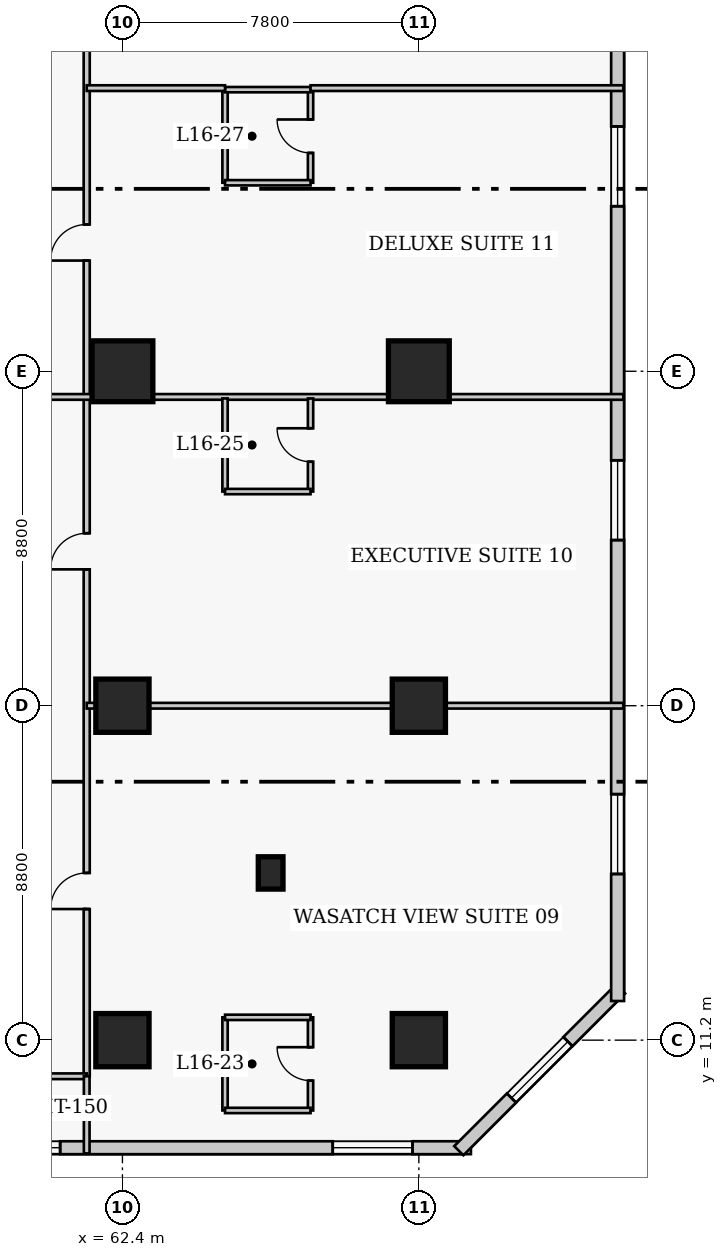
"""IFC4 building model, lengths in metres.
Left out: names, types, materials, properties, quantities, classifications, styles, units other than length and angle.
Written with IfcOpenShell. Run it as: python <this file> out.ifc"""

import sys

from ifc_helpers import new_model, si_unit, direction, frame, frame_2d, origin, origin_2d, place, context, subcontext, project, spatial, rectangle, extrude, element, fill, save


model = new_model("IFC4")
c1 = context("Model", 3, precision=1e-05, world=origin(), true_north=direction((0.0, 1.0)))
c2 = subcontext(c1, "Body", "Model", "MODEL_VIEW")
j1 = project(units=[si_unit("LENGTHUNIT", "METRE"), si_unit("PLANEANGLEUNIT", "RADIAN")], contexts=[c1])
p1 = place(None, origin())
s1 = spatial("IfcSite", under=j1, at=p1, CompositionType="ELEMENT")
p2 = place(p1, origin())
s2 = spatial("IfcBuilding", under=s1, at=p2, CompositionType="ELEMENT")
p3 = place(p2, frame((0.0, 0.0, 67.8)))
s3 = spatial("IfcBuildingStorey", under=s2, at=p3, CompositionType="ELEMENT", Elevation=67.8)
for number, where, z_axis, x_axis in (
    (1, (62.4, 11.2, 0.0), (0.0, 0.0, 1.0), (1.0, 0.0, 0.0)),
    (2, (62.4, 20.0, 0.0), (0.0, 0.0, 1.0), (1.0, 0.0, 0.0)),
):
    element("IfcColumn", number, at=place(p3, frame(where, z_axis=z_axis, x_axis=x_axis)), inside=s3, PredefinedType="COLUMN", context=c2, shape_type="SweptSolid", body=[
        extrude(rectangle(XDim=1.4, YDim=1.4, at=origin_2d()), origin(), (0.0, 0.0, 1.0), 3.8),
    ])
p4 = place(p3, frame((62.4, 28.8, 0.0), z_axis=(0.0, 0.0, 1.0), x_axis=(1.0, 0.0, 0.0)))
e3 = element("IfcColumn", 3, at=p4, inside=s3, PredefinedType="COLUMN", context=c2, shape_type="SweptSolid", body=[
    extrude(rectangle(XDim=1.6, YDim=1.6, at=origin_2d()), origin(), (0.0, 0.0, 1.0), 3.8),
])
for number, where, z_axis, x_axis in (
    (4, (70.2, 11.2, 0.0), (0.0, 0.0, 1.0), (1.0, 0.0, 0.0)),
    (5, (70.2, 20.0, 0.0), (0.0, 0.0, 1.0), (1.0, 0.0, 0.0)),
):
    element("IfcColumn", number, at=place(p3, frame(where, z_axis=z_axis, x_axis=x_axis)), inside=s3, PredefinedType="COLUMN", context=c2, shape_type="SweptSolid", body=[
        extrude(rectangle(XDim=1.4, YDim=1.4, at=origin_2d()), origin(), (0.0, 0.0, 1.0), 3.8),
    ])
p5 = place(p3, frame((70.2, 28.8, 0.0), z_axis=(0.0, 0.0, 1.0), x_axis=(1.0, 0.0, 0.0)))
e6 = element("IfcColumn", 6, at=p5, inside=s3, PredefinedType="COLUMN", context=c2, shape_type="SweptSolid", body=[
    extrude(rectangle(XDim=1.6, YDim=1.6, at=origin_2d()), origin(), (0.0, 0.0, 1.0), 3.8),
])
p6 = place(p3, frame((66.3, 15.6, 0.0), z_axis=(0.0, 0.0, 1.0), x_axis=(1.0, 0.0, 0.0)))
e7 = element("IfcColumn", 7, at=p6, inside=s3, PredefinedType="PILASTER", context=c2, shape_type="SweptSolid", body=[
    extrude(rectangle(XDim=0.65, YDim=0.85, at=origin_2d()), origin(), (0.0, 0.0, 1.0), 3.8),
])
p7 = place(p3, frame((41.68, 8.37, 0.0), z_axis=(0.0, 0.0, 1.0), x_axis=(1.0, 0.0, 0.0)))
e8 = element("IfcWall", 8, at=p7, inside=s3, PredefinedType="SOLIDWALL", context=c2, shape_type="SweptSolid", body=[
    extrude(rectangle(XDim=29.89, YDim=0.34, at=frame_2d((14.945, 0.0))), origin(), (0.0, 0.0, 1.0), 3.54),
])
p8 = place(p7, frame((2.036, 0.0, 0.85)))
e9 = element("IfcOpeningElement", 9, at=p8, cuts=e8, PredefinedType="OPENING", context=c2, shape_type="SweptSolid", body=[
    extrude(rectangle(XDim=2.1, YDim=1.85, at=frame_2d((1.05, 0.925))), frame((0.0, 0.18, 0.0), z_axis=(0.0, -1.0, 0.0), x_axis=(1.0, 0.0, 0.0)), (0.0, 0.0, 1.0), 0.36),
])
p9 = place(p7, frame((9.509, 0.0, 0.85)))
e10 = element("IfcOpeningElement", 10, at=p9, cuts=e8, PredefinedType="OPENING", context=c2, shape_type="SweptSolid", body=[
    extrude(rectangle(XDim=2.1, YDim=1.85, at=frame_2d((1.05, 0.925))), frame((0.0, 0.18, 0.0), z_axis=(0.0, -1.0, 0.0), x_axis=(1.0, 0.0, 0.0)), (0.0, 0.0, 1.0), 0.36),
])
p10 = place(p7, frame((16.981, 0.0, 0.85)))
e11 = element("IfcOpeningElement", 11, at=p10, cuts=e8, PredefinedType="OPENING", context=c2, shape_type="SweptSolid", body=[
    extrude(rectangle(XDim=2.1, YDim=1.85, at=frame_2d((1.05, 0.925))), frame((0.0, 0.18, 0.0), z_axis=(0.0, -1.0, 0.0), x_axis=(1.0, 0.0, 0.0)), (0.0, 0.0, 1.0), 0.36),
])
p11 = place(p7, frame((26.254, 0.0, 0.85)))
e12 = element("IfcOpeningElement", 12, at=p11, cuts=e8, PredefinedType="OPENING", context=c2, shape_type="SweptSolid", body=[
    extrude(rectangle(XDim=2.1, YDim=1.85, at=frame_2d((1.05, 0.925))), frame((0.0, 0.18, 0.0), z_axis=(0.0, -1.0, 0.0), x_axis=(1.0, 0.0, 0.0)), (0.0, 0.0, 1.0), 0.36),
])
p12 = place(p7, frame((14.265, 0.0, 0.85)))
e13 = element("IfcOpeningElement", 13, at=p12, cuts=e8, PredefinedType="OPENING", context=c2, shape_type="SweptSolid", body=[
    extrude(rectangle(XDim=1.3, YDim=1.7, at=frame_2d((0.65, 0.85))), frame((0.0, 0.18, 0.0), z_axis=(0.0, -1.0, 0.0), x_axis=(1.0, 0.0, 0.0)), (0.0, 0.0, 1.0), 0.36),
])
p13 = place(p3, frame((71.251, 8.292, 0.0), z_axis=(0.0, 0.0, 1.0), x_axis=(0.707106781187, 0.707106781187, 0.0)))
e14 = element("IfcWall", 14, at=p13, inside=s3, PredefinedType="SOLIDWALL", context=c2, shape_type="SweptSolid", body=[
    extrude(rectangle(XDim=6.02, YDim=0.34, at=frame_2d((3.01, 0.0))), origin(), (0.0, 0.0, 1.0), 3.54),
])
p14 = place(p13, frame((1.96, 0.0, 0.85)))
e15 = element("IfcOpeningElement", 15, at=p14, cuts=e14, PredefinedType="OPENING", context=c2, shape_type="SweptSolid", body=[
    extrude(rectangle(XDim=2.1, YDim=1.85, at=frame_2d((1.05, 0.925))), frame((0.0, 0.18, 0.0), z_axis=(0.0, -1.0, 0.0), x_axis=(1.0, 0.0, 0.0)), (0.0, 0.0, 1.0), 0.36),
])
p15 = place(p3, frame((75.43, 12.23, 0.0), z_axis=(0.0, 0.0, 1.0), x_axis=(0.0, 1.0, 0.0)))
e16 = element("IfcWall", 16, at=p15, inside=s3, PredefinedType="SOLIDWALL", context=c2, shape_type="SweptSolid", body=[
    extrude(rectangle(XDim=35.14, YDim=0.34, at=frame_2d((17.57, 0.0))), origin(), (0.0, 0.0, 1.0), 3.54),
])
p16 = place(p15, frame((3.343, 0.0, 0.85)))
e17 = element("IfcOpeningElement", 17, at=p16, cuts=e16, PredefinedType="OPENING", context=c2, shape_type="SweptSolid", body=[
    extrude(rectangle(XDim=2.1, YDim=1.85, at=frame_2d((1.05, 0.925))), frame((0.0, 0.18, 0.0), z_axis=(0.0, -1.0, 0.0), x_axis=(1.0, 0.0, 0.0)), (0.0, 0.0, 1.0), 0.36),
])
p17 = place(p15, frame((12.127, 0.0, 0.85)))
e18 = element("IfcOpeningElement", 18, at=p17, cuts=e16, PredefinedType="OPENING", context=c2, shape_type="SweptSolid", body=[
    extrude(rectangle(XDim=2.1, YDim=1.85, at=frame_2d((1.05, 0.925))), frame((0.0, 0.18, 0.0), z_axis=(0.0, -1.0, 0.0), x_axis=(1.0, 0.0, 0.0)), (0.0, 0.0, 1.0), 0.36),
])
p18 = place(p15, frame((20.913, 0.0, 0.85)))
e19 = element("IfcOpeningElement", 19, at=p18, cuts=e16, PredefinedType="OPENING", context=c2, shape_type="SweptSolid", body=[
    extrude(rectangle(XDim=2.1, YDim=1.85, at=frame_2d((1.05, 0.925))), frame((0.0, 0.18, 0.0), z_axis=(0.0, -1.0, 0.0), x_axis=(1.0, 0.0, 0.0)), (0.0, 0.0, 1.0), 0.36),
])
p19 = place(p15, frame((29.698, 0.0, 0.85)))
e20 = element("IfcOpeningElement", 20, at=p19, cuts=e16, PredefinedType="OPENING", context=c2, shape_type="SweptSolid", body=[
    extrude(rectangle(XDim=2.1, YDim=1.85, at=frame_2d((1.05, 0.925))), frame((0.0, 0.18, 0.0), z_axis=(0.0, -1.0, 0.0), x_axis=(1.0, 0.0, 0.0)), (0.0, 0.0, 1.0), 0.36),
])
p20 = place(p3, frame((61.46, 10.25, 0.0), z_axis=(0.0, 0.0, 1.0), x_axis=(0.0, 1.0, 0.0)))
e21 = element("IfcWall", 21, at=p20, inside=s3, PredefinedType="PARTITIONING", context=c2, shape_type="SweptSolid", body=[
    extrude(rectangle(XDim=30.4, YDim=0.16, at=frame_2d((15.2, 0.0))), origin(), (0.0, 0.0, 1.0), 3.54),
])
p21 = place(p20, frame((4.4, 0.0, 0.0)))
e22 = element("IfcOpeningElement", 22, at=p21, cuts=e21, PredefinedType="OPENING", context=c2, shape_type="SweptSolid", body=[
    extrude(rectangle(XDim=0.95, YDim=2.1, at=frame_2d((0.475, 1.05))), frame((0.0, 0.09, 0.0), z_axis=(0.0, -1.0, 0.0), x_axis=(1.0, 0.0, 0.0)), (0.0, 0.0, 1.0), 0.18),
])
p22 = place(p20, frame((13.337, 0.0, 0.0)))
e23 = element("IfcOpeningElement", 23, at=p22, cuts=e21, PredefinedType="OPENING", context=c2, shape_type="SweptSolid", body=[
    extrude(rectangle(XDim=0.95, YDim=2.1, at=frame_2d((0.475, 1.05))), frame((0.0, 0.09, 0.0), z_axis=(0.0, -1.0, 0.0), x_axis=(1.0, 0.0, 0.0)), (0.0, 0.0, 1.0), 0.18),
])
p23 = place(p20, frame((21.462, 0.0, 0.0)))
e24 = element("IfcOpeningElement", 24, at=p23, cuts=e21, PredefinedType="OPENING", context=c2, shape_type="SweptSolid", body=[
    extrude(rectangle(XDim=0.95, YDim=2.1, at=frame_2d((0.475, 1.05))), frame((0.0, 0.09, 0.0), z_axis=(0.0, -1.0, 0.0), x_axis=(1.0, 0.0, 0.0)), (0.0, 0.0, 1.0), 0.18),
])
p24 = place(p20, frame((28.96, 0.0, 0.0)))
e25 = element("IfcOpeningElement", 25, at=p24, cuts=e21, PredefinedType="OPENING", context=c2, shape_type="SweptSolid", body=[
    extrude(rectangle(XDim=1.0, YDim=2.15, at=frame_2d((0.5, 1.075))), frame((0.0, 0.09, 0.0), z_axis=(0.0, -1.0, 0.0), x_axis=(1.0, 0.0, 0.0)), (0.0, 0.0, 1.0), 0.18),
])
p25 = place(p3, frame((59.24, 10.25, 0.0), z_axis=(0.0, 0.0, 1.0), x_axis=(1.0, 0.0, 0.0)))
e26 = element("IfcWall", 26, at=p25, inside=s3, PredefinedType="PARTITIONING", context=c2, shape_type="SweptSolid", body=[
    extrude(rectangle(XDim=2.22, YDim=0.15, at=frame_2d((1.11, 0.0))), origin(), (0.0, 0.0, 1.0), 3.54),
])
p26 = place(p3, frame((61.46, 8.22, 0.0), z_axis=(0.0, 0.0, 1.0), x_axis=(0.0, 1.0, 0.0)))
e27 = element("IfcWall", 27, at=p26, inside=s3, PredefinedType="PARTITIONING", context=c2, shape_type="SweptSolid", body=[
    extrude(rectangle(XDim=2.03, YDim=0.15, at=frame_2d((1.015, 0.0))), origin(), (0.0, 0.0, 1.0), 3.54),
])
p27 = place(p3, frame((65.1, 9.35, 0.0), z_axis=(0.0, 0.0, 1.0), x_axis=(0.0, 1.0, 0.0)))
e28 = element("IfcWall", 28, at=p27, inside=s3, PredefinedType="PLUMBINGWALL", context=c2, shape_type="SweptSolid", body=[
    extrude(rectangle(XDim=2.45, YDim=0.14, at=frame_2d((1.225, 0.0))), origin(), (0.0, 0.0, 1.0), 3.54),
])
p28 = place(p3, frame((67.35, 9.35, 0.0), z_axis=(0.0, 0.0, 1.0), x_axis=(0.0, 1.0, 0.0)))
e29 = element("IfcWall", 29, at=p28, inside=s3, PredefinedType="PLUMBINGWALL", context=c2, shape_type="SweptSolid", body=[
    extrude(rectangle(XDim=2.45, YDim=0.14, at=frame_2d((1.225, 0.0))), origin(), (0.0, 0.0, 1.0), 3.54),
])
p29 = place(p28, frame((0.785, 0.0, 0.0)))
e30 = element("IfcOpeningElement", 30, at=p29, cuts=e29, PredefinedType="OPENING", context=c2, shape_type="SweptSolid", body=[
    extrude(rectangle(XDim=0.88, YDim=2.05, at=frame_2d((0.44, 1.025))), frame((0.0, 0.08, 0.0), z_axis=(0.0, -1.0, 0.0), x_axis=(1.0, 0.0, 0.0)), (0.0, 0.0, 1.0), 0.16),
])
for number, where, z_axis, x_axis in (
    (31, (65.1, 9.35, 0.0), (0.0, 0.0, 1.0), (1.0, 0.0, 0.0)),
    (32, (65.1, 11.8, 0.0), (0.0, 0.0, 1.0), (1.0, 0.0, 0.0)),
):
    element("IfcWall", number, at=place(p3, frame(where, z_axis=z_axis, x_axis=x_axis)), inside=s3, PredefinedType="PLUMBINGWALL", context=c2, shape_type="SweptSolid", body=[
        extrude(rectangle(XDim=2.25, YDim=0.14, at=frame_2d((1.125, 0.0))), origin(), (0.0, 0.0, 1.0), 3.54),
    ])
p30 = place(p3, frame((61.46, 20.0, 0.0), z_axis=(0.0, 0.0, 1.0), x_axis=(1.0, 0.0, 0.0)))
e33 = element("IfcWall", 33, at=p30, inside=s3, PredefinedType="PARTITIONING", context=c2, shape_type="SweptSolid", body=[
    extrude(rectangle(XDim=14.12, YDim=0.15, at=frame_2d((7.06, 0.0))), origin(), (0.0, 0.0, 1.0), 2.593),
])
p31 = place(p3, frame((59.51, 28.125, 0.0), z_axis=(0.0, 0.0, 1.0), x_axis=(1.0, 0.0, 0.0)))
e34 = element("IfcWall", 34, at=p31, inside=s3, PredefinedType="PARTITIONING", context=c2, shape_type="SweptSolid", body=[
    extrude(rectangle(XDim=16.07, YDim=0.15, at=frame_2d((8.035, 0.0))), origin(), (0.0, 0.0, 1.0), 3.54),
])
p32 = place(p3, frame((65.1, 25.635, 0.0), z_axis=(0.0, 0.0, 1.0), x_axis=(0.0, 1.0, 0.0)))
e35 = element("IfcWall", 35, at=p32, inside=s3, PredefinedType="PLUMBINGWALL", context=c2, shape_type="SweptSolid", body=[
    extrude(rectangle(XDim=2.45, YDim=0.14, at=frame_2d((1.225, 0.0))), origin(), (0.0, 0.0, 1.0), 3.54),
])
p33 = place(p3, frame((67.35, 25.635, 0.0), z_axis=(0.0, 0.0, 1.0), x_axis=(0.0, 1.0, 0.0)))
e36 = element("IfcWall", 36, at=p33, inside=s3, PredefinedType="PLUMBINGWALL", context=c2, shape_type="SweptSolid", body=[
    extrude(rectangle(XDim=2.45, YDim=0.14, at=frame_2d((1.225, 0.0))), origin(), (0.0, 0.0, 1.0), 3.54),
])
p34 = place(p33, frame((0.785, 0.0, 0.0)))
e37 = element("IfcOpeningElement", 37, at=p34, cuts=e36, PredefinedType="OPENING", context=c2, shape_type="SweptSolid", body=[
    extrude(rectangle(XDim=0.88, YDim=2.05, at=frame_2d((0.44, 1.025))), frame((0.0, 0.08, 0.0), z_axis=(0.0, -1.0, 0.0), x_axis=(1.0, 0.0, 0.0)), (0.0, 0.0, 1.0), 0.16),
])
p35 = place(p3, frame((65.1, 25.635, 0.0), z_axis=(0.0, 0.0, 1.0), x_axis=(1.0, 0.0, 0.0)))
e38 = element("IfcWall", 38, at=p35, inside=s3, PredefinedType="PLUMBINGWALL", context=c2, shape_type="SweptSolid", body=[
    extrude(rectangle(XDim=2.25, YDim=0.14, at=frame_2d((1.125, 0.0))), origin(), (0.0, 0.0, 1.0), 3.54),
])
p36 = place(p3, frame((65.1, 33.76, 0.0), z_axis=(0.0, 0.0, 1.0), x_axis=(0.0, 1.0, 0.0)))
e39 = element("IfcWall", 39, at=p36, inside=s3, PredefinedType="PLUMBINGWALL", context=c2, shape_type="SweptSolid", body=[
    extrude(rectangle(XDim=2.45, YDim=0.14, at=frame_2d((1.225, 0.0))), origin(), (0.0, 0.0, 1.0), 3.54),
])
p37 = place(p3, frame((67.35, 33.76, 0.0), z_axis=(0.0, 0.0, 1.0), x_axis=(0.0, 1.0, 0.0)))
e40 = element("IfcWall", 40, at=p37, inside=s3, PredefinedType="PLUMBINGWALL", context=c2, shape_type="SweptSolid", body=[
    extrude(rectangle(XDim=2.45, YDim=0.14, at=frame_2d((1.225, 0.0))), origin(), (0.0, 0.0, 1.0), 3.54),
])
p38 = place(p37, frame((0.785, 0.0, 0.0)))
e41 = element("IfcOpeningElement", 41, at=p38, cuts=e40, PredefinedType="OPENING", context=c2, shape_type="SweptSolid", body=[
    extrude(rectangle(XDim=0.88, YDim=2.05, at=frame_2d((0.44, 1.025))), frame((0.0, 0.08, 0.0), z_axis=(0.0, -1.0, 0.0), x_axis=(1.0, 0.0, 0.0)), (0.0, 0.0, 1.0), 0.16),
])
for number, where, z_axis, x_axis in (
    (42, (65.1, 33.76, 0.0), (0.0, 0.0, 1.0), (1.0, 0.0, 0.0)),
    (43, (65.1, 36.21, 0.0), (0.0, 0.0, 1.0), (1.0, 0.0, 0.0)),
):
    element("IfcWall", number, at=place(p3, frame(where, z_axis=z_axis, x_axis=x_axis)), inside=s3, PredefinedType="PLUMBINGWALL", context=c2, shape_type="SweptSolid", body=[
        extrude(rectangle(XDim=2.25, YDim=0.14, at=frame_2d((1.125, 0.0))), origin(), (0.0, 0.0, 1.0), 3.54),
    ])
p39 = place(p3, frame((61.46, 36.25, 0.0), z_axis=(0.0, 0.0, 1.0), x_axis=(1.0, 0.0, 0.0)))
e44 = element("IfcWall", 44, at=p39, inside=s3, PredefinedType="PARTITIONING", context=c2, shape_type="SweptSolid", body=[
    extrude(rectangle(XDim=3.64, YDim=0.15, at=frame_2d((1.82, 0.0))), origin(), (0.0, 0.0, 1.0), 3.54),
])
p40 = place(p3, frame((67.35, 36.25, 0.0), z_axis=(0.0, 0.0, 1.0), x_axis=(1.0, 0.0, 0.0)))
e45 = element("IfcWall", 45, at=p40, inside=s3, PredefinedType="PARTITIONING", context=c2, shape_type="SweptSolid", body=[
    extrude(rectangle(XDim=8.23, YDim=0.15, at=frame_2d((4.115, 0.0))), origin(), (0.0, 0.0, 1.0), 3.54),
])
p41 = place(p10, origin())
e46 = element("IfcWindow", 46, at=p41, inside=s3, PartitioningType="SINGLE_PANEL", PredefinedType="WINDOW", context=c2, shape_type="SweptSolid", body=[
    extrude(rectangle(XDim=2.1, YDim=1.85, at=frame_2d((1.05, 0.925))), frame((0.0, 0.03, 0.0), z_axis=(0.0, -1.0, 0.0), x_axis=(1.0, 0.0, 0.0)), (0.0, 0.0, 1.0), 0.06),
])
fill(e11, e46)
p42 = place(p11, origin())
e47 = element("IfcWindow", 47, at=p42, inside=s3, PartitioningType="SINGLE_PANEL", PredefinedType="WINDOW", context=c2, shape_type="SweptSolid", body=[
    extrude(rectangle(XDim=2.1, YDim=1.85, at=frame_2d((1.05, 0.925))), frame((0.0, 0.03, 0.0), z_axis=(0.0, -1.0, 0.0), x_axis=(1.0, 0.0, 0.0)), (0.0, 0.0, 1.0), 0.06),
])
fill(e12, e47)
p43 = place(p14, origin())
e48 = element("IfcWindow", 48, at=p43, inside=s3, PartitioningType="SINGLE_PANEL", PredefinedType="WINDOW", context=c2, shape_type="SweptSolid", body=[
    extrude(rectangle(XDim=2.1, YDim=1.85, at=frame_2d((1.05, 0.925))), frame((0.0, 0.03, 0.0), z_axis=(0.0, -1.0, 0.0), x_axis=(1.0, 0.0, 0.0)), (0.0, 0.0, 1.0), 0.06),
])
fill(e15, e48)
p44 = place(p16, origin())
e49 = element("IfcWindow", 49, at=p44, inside=s3, PartitioningType="SINGLE_PANEL", PredefinedType="WINDOW", context=c2, shape_type="SweptSolid", body=[
    extrude(rectangle(XDim=2.1, YDim=1.85, at=frame_2d((1.05, 0.925))), frame((0.0, 0.03, 0.0), z_axis=(0.0, -1.0, 0.0), x_axis=(1.0, 0.0, 0.0)), (0.0, 0.0, 1.0), 0.06),
])
fill(e17, e49)
p45 = place(p17, origin())
e50 = element("IfcWindow", 50, at=p45, inside=s3, PartitioningType="SINGLE_PANEL", PredefinedType="WINDOW", context=c2, shape_type="SweptSolid", body=[
    extrude(rectangle(XDim=2.1, YDim=1.85, at=frame_2d((1.05, 0.925))), frame((0.0, 0.03, 0.0), z_axis=(0.0, -1.0, 0.0), x_axis=(1.0, 0.0, 0.0)), (0.0, 0.0, 1.0), 0.06),
])
fill(e18, e50)
p46 = place(p18, origin())
e51 = element("IfcWindow", 51, at=p46, inside=s3, PartitioningType="SINGLE_PANEL", PredefinedType="WINDOW", context=c2, shape_type="SweptSolid", body=[
    extrude(rectangle(XDim=2.1, YDim=1.85, at=frame_2d((1.05, 0.925))), frame((0.0, 0.03, 0.0), z_axis=(0.0, -1.0, 0.0), x_axis=(1.0, 0.0, 0.0)), (0.0, 0.0, 1.0), 0.06),
])
fill(e19, e51)
p47 = place(p29, origin())
e52 = element("IfcDoor", 52, at=p47, inside=s3, OperationType="SINGLE_SWING_RIGHT", PredefinedType="DOOR", context=c2, shape_type="SweptSolid", body=[
    extrude(rectangle(XDim=0.88, YDim=2.05, at=frame_2d((0.44, 1.025))), frame((0.0, 0.025, 0.0), z_axis=(0.0, -1.0, 0.0), x_axis=(1.0, 0.0, 0.0)), (0.0, 0.0, 1.0), 0.05),
])
fill(e30, e52)
p48 = place(p21, origin())
e53 = element("IfcDoor", 53, at=p48, inside=s3, OperationType="SINGLE_SWING_LEFT", PredefinedType="DOOR", context=c2, shape_type="SweptSolid", body=[
    extrude(rectangle(XDim=0.95, YDim=2.1, at=frame_2d((0.475, 1.05))), frame((0.0, 0.025, 0.0), z_axis=(0.0, -1.0, 0.0), x_axis=(1.0, 0.0, 0.0)), (0.0, 0.0, 1.0), 0.05),
])
fill(e22, e53)
p49 = place(p34, origin())
e54 = element("IfcDoor", 54, at=p49, inside=s3, OperationType="SINGLE_SWING_RIGHT", PredefinedType="DOOR", context=c2, shape_type="SweptSolid", body=[
    extrude(rectangle(XDim=0.88, YDim=2.05, at=frame_2d((0.44, 1.025))), frame((0.0, 0.025, 0.0), z_axis=(0.0, -1.0, 0.0), x_axis=(1.0, 0.0, 0.0)), (0.0, 0.0, 1.0), 0.05),
])
fill(e37, e54)
p50 = place(p22, origin())
e55 = element("IfcDoor", 55, at=p50, inside=s3, OperationType="SINGLE_SWING_LEFT", PredefinedType="DOOR", context=c2, shape_type="SweptSolid", body=[
    extrude(rectangle(XDim=0.95, YDim=2.1, at=frame_2d((0.475, 1.05))), frame((0.0, 0.025, 0.0), z_axis=(0.0, -1.0, 0.0), x_axis=(1.0, 0.0, 0.0)), (0.0, 0.0, 1.0), 0.05),
])
fill(e23, e55)
p51 = place(p38, origin())
e56 = element("IfcDoor", 56, at=p51, inside=s3, OperationType="SINGLE_SWING_RIGHT", PredefinedType="DOOR", context=c2, shape_type="SweptSolid", body=[
    extrude(rectangle(XDim=0.88, YDim=2.05, at=frame_2d((0.44, 1.025))), frame((0.0, 0.025, 0.0), z_axis=(0.0, -1.0, 0.0), x_axis=(1.0, 0.0, 0.0)), (0.0, 0.0, 1.0), 0.05),
])
fill(e41, e56)
p52 = place(p23, origin())
e57 = element("IfcDoor", 57, at=p52, inside=s3, OperationType="SINGLE_SWING_LEFT", PredefinedType="DOOR", context=c2, shape_type="SweptSolid", body=[
    extrude(rectangle(XDim=0.95, YDim=2.1, at=frame_2d((0.475, 1.05))), frame((0.0, 0.025, 0.0), z_axis=(0.0, -1.0, 0.0), x_axis=(1.0, 0.0, 0.0)), (0.0, 0.0, 1.0), 0.05),
])
fill(e24, e57)
save(model, sys.argv[1])
